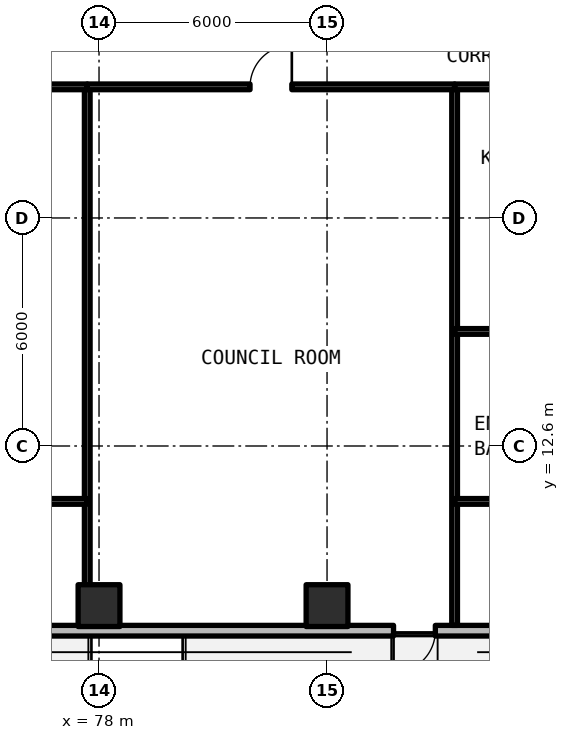
"""IFC4 building model, lengths in metres.
Left out: names, types, materials, properties, quantities, classifications, styles, units other than length and angle.
Written with IfcOpenShell. Run it as: python <this file> out.ifc"""

import sys

from ifc_helpers import new_model, si_unit, direction, frame, frame_2d, origin, origin_2d, place, context, subcontext, project, spatial, rectangle, extrude, element, fill, save


model = new_model("IFC4")
c1 = context("Model", 3, precision=1e-05, world=origin(), true_north=direction((0.0, 1.0)))
c2 = subcontext(c1, "Body", "Model", "MODEL_VIEW")
j1 = project(units=[si_unit("LENGTHUNIT", "METRE"), si_unit("PLANEANGLEUNIT", "RADIAN")], contexts=[c1])
p1 = place(None, origin())
s1 = spatial("IfcSite", under=j1, at=p1, CompositionType="ELEMENT")
p2 = place(p1, origin())
s2 = spatial("IfcBuilding", under=s1, at=p2, CompositionType="ELEMENT")
p3 = place(p2, frame((0.0, 0.0, 66.0)))
s3 = spatial("IfcBuildingStorey", under=s2, at=p3, CompositionType="ELEMENT", Elevation=66.0)
for number, where, z_axis, x_axis in (
    (1, (78.0, 8.4, 0.0), (0.0, 0.0, 1.0), (1.0, 0.0, 0.0)),
    (2, (84.0, 8.4, 0.0), (0.0, 0.0, 1.0), (1.0, 0.0, 0.0)),
):
    element("IfcColumn", number, at=place(p3, frame(where, z_axis=z_axis, x_axis=x_axis)), inside=s3, PredefinedType="COLUMN", context=c2, shape_type="SweptSolid", body=[
        extrude(rectangle(XDim=1.1, YDim=1.1, at=origin_2d()), origin(), (0.0, 0.0, 1.0), 3.63),
    ])
p4 = place(p3, frame((52.14, 7.74, 0.0), z_axis=(0.0, 0.0, 1.0), x_axis=(1.0, 0.0, 0.0)))
e3 = element("IfcWall", 3, at=p4, inside=s3, PredefinedType="SOLIDWALL", context=c2, shape_type="SweptSolid", body=[
    extrude(rectangle(XDim=44.402, YDim=0.28, at=frame_2d((22.201, 0.0))), origin(), (0.0, 0.0, 1.0), 3.41),
])
p5 = place(p4, frame((9.66, 0.0, 0.0)))
e4 = element("IfcOpeningElement", 4, at=p5, cuts=e3, PredefinedType="OPENING", context=c2, shape_type="SweptSolid", body=[
    extrude(rectangle(XDim=1.1, YDim=2.15, at=frame_2d((0.55, 1.075))), frame((0.0, 0.15, 0.0), z_axis=(0.0, -1.0, 0.0), x_axis=(1.0, 0.0, 0.0)), (0.0, 0.0, 1.0), 0.3),
])
p6 = place(p4, frame((21.76, 0.0, 0.0)))
e5 = element("IfcOpeningElement", 5, at=p6, cuts=e3, PredefinedType="OPENING", context=c2, shape_type="SweptSolid", body=[
    extrude(rectangle(XDim=1.1, YDim=2.15, at=frame_2d((0.55, 1.075))), frame((0.0, 0.15, 0.0), z_axis=(0.0, -1.0, 0.0), x_axis=(1.0, 0.0, 0.0)), (0.0, 0.0, 1.0), 0.3),
])
p7 = place(p4, frame((33.61, 0.0, 0.0)))
e6 = element("IfcOpeningElement", 6, at=p7, cuts=e3, PredefinedType="OPENING", context=c2, shape_type="SweptSolid", body=[
    extrude(rectangle(XDim=1.1, YDim=2.15, at=frame_2d((0.55, 1.075))), frame((0.0, 0.15, 0.0), z_axis=(0.0, -1.0, 0.0), x_axis=(1.0, 0.0, 0.0)), (0.0, 0.0, 1.0), 0.3),
])
p8 = place(p4, frame((2.622, 0.0, 0.78)))
e7 = element("IfcOpeningElement", 7, at=p8, cuts=e3, PredefinedType="OPENING", context=c2, shape_type="SweptSolid", body=[
    extrude(rectangle(XDim=2.2, YDim=1.66, at=frame_2d((1.1, 0.83))), frame((0.0, 0.15, 0.0), z_axis=(0.0, -1.0, 0.0), x_axis=(1.0, 0.0, 0.0)), (0.0, 0.0, 1.0), 0.3),
])
p9 = place(p4, frame((38.638, 0.0, 0.78)))
e8 = element("IfcOpeningElement", 8, at=p9, cuts=e3, PredefinedType="OPENING", context=c2, shape_type="SweptSolid", body=[
    extrude(rectangle(XDim=2.2, YDim=1.66, at=frame_2d((1.1, 0.83))), frame((0.0, 0.15, 0.0), z_axis=(0.0, -1.0, 0.0), x_axis=(1.0, 0.0, 0.0)), (0.0, 0.0, 1.0), 0.3),
])
p10 = place(p3, frame((77.69, 7.88, 0.0), z_axis=(0.0, 0.0, 1.0), x_axis=(0.0, 1.0, 0.0)))
e9 = element("IfcWall", 9, at=p10, inside=s3, PredefinedType="SOLIDWALL", context=c2, shape_type="SweptSolid", body=[
    extrude(rectangle(XDim=14.17, YDim=0.15, at=frame_2d((7.085, 0.0))), origin(), (0.0, 0.0, 1.0), 2.63),
])
p11 = place(p3, frame((68.647, 11.142, 0.0), z_axis=(0.0, 0.0, 1.0), x_axis=(1.0, 0.0, 0.0)))
e10 = element("IfcWall", 10, at=p11, inside=s3, PredefinedType="PARTITIONING", context=c2, shape_type="SweptSolid", body=[
    extrude(rectangle(XDim=9.043, YDim=0.15, at=frame_2d((4.521, 0.0))), origin(), (0.0, 0.0, 1.0), 2.63),
])
p12 = place(p11, frame((4.853, 0.0, 0.0)))
e11 = element("IfcOpeningElement", 11, at=p12, cuts=e10, PredefinedType="OPENING", context=c2, shape_type="SweptSolid", body=[
    extrude(rectangle(XDim=0.85, YDim=2.1, at=frame_2d((0.425, 1.05))), frame((0.0, 0.085, 0.0), z_axis=(0.0, -1.0, 0.0), x_axis=(1.0, 0.0, 0.0)), (0.0, 0.0, 1.0), 0.17),
])
p13 = place(p3, frame((68.647, 22.05, 0.0), z_axis=(0.0, 0.0, 1.0), x_axis=(1.0, 0.0, 0.0)))
e12 = element("IfcWall", 12, at=p13, inside=s3, PredefinedType="SOLIDWALL", context=c2, shape_type="SweptSolid", body=[
    extrude(rectangle(XDim=9.043, YDim=0.15, at=frame_2d((4.521, 0.0))), origin(), (0.0, 0.0, 1.0), 2.63),
])
p14 = place(p13, frame((4.803, 0.0, 0.0)))
e13 = element("IfcOpeningElement", 13, at=p14, cuts=e12, PredefinedType="OPENING", context=c2, shape_type="SweptSolid", body=[
    extrude(rectangle(XDim=0.95, YDim=2.15, at=frame_2d((0.475, 1.075))), frame((0.0, 0.085, 0.0), z_axis=(0.0, -1.0, 0.0), x_axis=(1.0, 0.0, 0.0)), (0.0, 0.0, 1.0), 0.17),
])
p15 = place(p3, frame((87.357, 7.88, 0.0), z_axis=(0.0, 0.0, 1.0), x_axis=(0.0, 1.0, 0.0)))
e14 = element("IfcWall", 14, at=p15, inside=s3, PredefinedType="SOLIDWALL", context=c2, shape_type="SweptSolid", body=[
    extrude(rectangle(XDim=14.17, YDim=0.15, at=frame_2d((7.085, 0.0))), origin(), (0.0, 0.0, 1.0), 2.63),
])
p16 = place(p3, frame((77.69, 22.05, 0.0), z_axis=(0.0, 0.0, 1.0), x_axis=(1.0, 0.0, 0.0)))
e15 = element("IfcWall", 15, at=p16, inside=s3, PredefinedType="SOLIDWALL", context=c2, shape_type="SweptSolid", body=[
    extrude(rectangle(XDim=9.667, YDim=0.15, at=frame_2d((4.833, 0.0))), origin(), (0.0, 0.0, 1.0), 2.63),
])
p17 = place(p16, frame((4.283, 0.0, 0.0)))
e16 = element("IfcOpeningElement", 16, at=p17, cuts=e15, PredefinedType="OPENING", context=c2, shape_type="SweptSolid", body=[
    extrude(rectangle(XDim=1.1, YDim=2.15, at=frame_2d((0.55, 1.075))), frame((0.0, 0.085, 0.0), z_axis=(0.0, -1.0, 0.0), x_axis=(1.0, 0.0, 0.0)), (0.0, 0.0, 1.0), 0.17),
])
p18 = place(p3, frame((87.357, 15.615, 0.0), z_axis=(0.0, 0.0, 1.0), x_axis=(1.0, 0.0, 0.0)))
e17 = element("IfcWall", 17, at=p18, inside=s3, PredefinedType="PARTITIONING", context=c2, shape_type="SweptSolid", body=[
    extrude(rectangle(XDim=4.563, YDim=0.15, at=frame_2d((2.281, 0.0))), origin(), (0.0, 0.0, 1.0), 2.63),
])
p19 = place(p3, frame((87.357, 11.142, 0.0), z_axis=(0.0, 0.0, 1.0), x_axis=(1.0, 0.0, 0.0)))
e18 = element("IfcWall", 18, at=p19, inside=s3, PredefinedType="PARTITIONING", context=c2, shape_type="SweptSolid", body=[
    extrude(rectangle(XDim=9.043, YDim=0.15, at=frame_2d((4.521, 0.0))), origin(), (0.0, 0.0, 1.0), 2.63),
])
p20 = place(p19, frame((6.418, 0.0, 0.0)))
e19 = element("IfcOpeningElement", 19, at=p20, cuts=e18, PredefinedType="OPENING", context=c2, shape_type="SweptSolid", body=[
    extrude(rectangle(XDim=0.85, YDim=2.1, at=frame_2d((0.425, 1.05))), frame((0.0, 0.085, 0.0), z_axis=(0.0, -1.0, 0.0), x_axis=(1.0, 0.0, 0.0)), (0.0, 0.0, 1.0), 0.17),
])
p21 = place(p3, frame((87.357, 22.05, 0.0), z_axis=(0.0, 0.0, 1.0), x_axis=(1.0, 0.0, 0.0)))
e20 = element("IfcWall", 20, at=p21, inside=s3, PredefinedType="SOLIDWALL", context=c2, shape_type="SweptSolid", body=[
    extrude(rectangle(XDim=9.043, YDim=0.15, at=frame_2d((4.521, 0.0))), origin(), (0.0, 0.0, 1.0), 2.63),
])
p22 = place(p21, frame((6.368, 0.0, 0.0)))
e21 = element("IfcOpeningElement", 21, at=p22, cuts=e20, PredefinedType="OPENING", context=c2, shape_type="SweptSolid", body=[
    extrude(rectangle(XDim=0.95, YDim=2.15, at=frame_2d((0.475, 1.075))), frame((0.0, 0.085, 0.0), z_axis=(0.0, -1.0, 0.0), x_axis=(1.0, 0.0, 0.0)), (0.0, 0.0, 1.0), 0.17),
])
p23 = place(p7, frame((1.1, 0.0, 0.0), z_axis=(0.0, 0.0, 1.0), x_axis=(-1.0, 0.0, 0.0)))
e22 = element("IfcDoor", 22, at=p23, inside=s3, OperationType="SINGLE_SWING_LEFT", PredefinedType="DOOR", context=c2, shape_type="SweptSolid", body=[
    extrude(rectangle(XDim=1.1, YDim=2.15, at=frame_2d((0.55, 1.075))), frame((0.0, 0.025, 0.0), z_axis=(0.0, -1.0, 0.0), x_axis=(1.0, 0.0, 0.0)), (0.0, 0.0, 1.0), 0.05),
])
fill(e6, e22)
p24 = place(p17, origin())
e23 = element("IfcDoor", 23, at=p24, inside=s3, OperationType="SINGLE_SWING_RIGHT", PredefinedType="DOOR", context=c2, shape_type="SweptSolid", body=[
    extrude(rectangle(XDim=1.1, YDim=2.15, at=frame_2d((0.55, 1.075))), frame((0.0, 0.025, 0.0), z_axis=(0.0, -1.0, 0.0), x_axis=(1.0, 0.0, 0.0)), (0.0, 0.0, 1.0), 0.05),
])
fill(e16, e23)
save(model, sys.argv[1])
